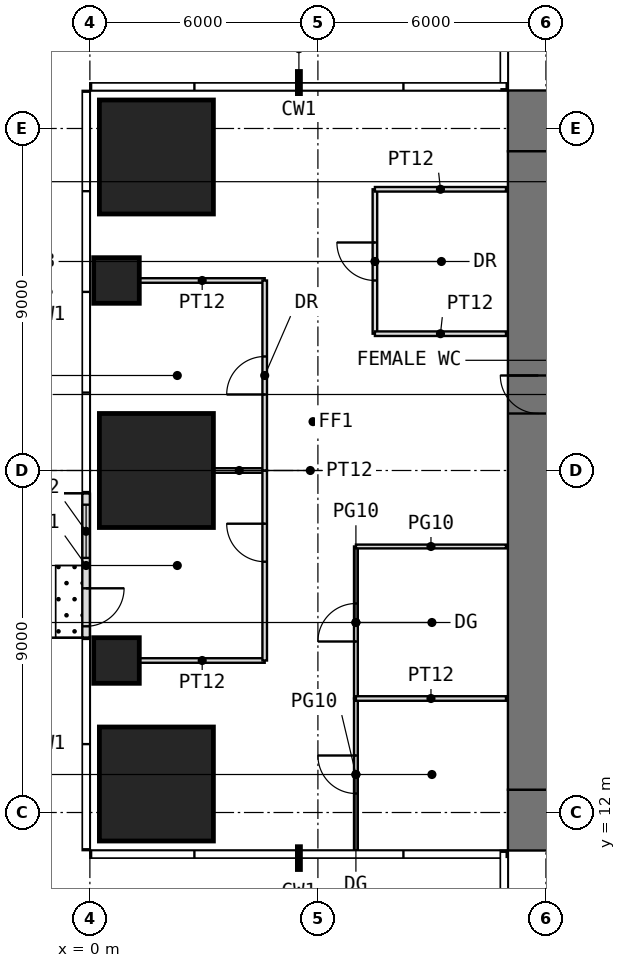
"""IFC4 building model, lengths in metres.
Left out: names, types, materials, properties, quantities, classifications, styles, units other than length and angle.
Written with IfcOpenShell. Run it as: python <this file> out.ifc"""

import sys

from ifc_helpers import new_model, si_unit, direction, frame, frame_2d, origin, origin_2d, place, context, subcontext, project, spatial, rectangle, extrude, element, fill, save


model = new_model("IFC4")
c1 = context("Model", 3, precision=1e-05, world=origin(), true_north=direction((0.0, 1.0)))
c2 = subcontext(c1, "Body", "Model", "MODEL_VIEW")
j1 = project(units=[si_unit("LENGTHUNIT", "METRE"), si_unit("PLANEANGLEUNIT", "RADIAN")], contexts=[c1])
p1 = place(None, origin())
s1 = spatial("IfcSite", under=j1, at=p1, CompositionType="ELEMENT")
p2 = place(p1, origin())
s2 = spatial("IfcBuilding", under=s1, at=p2, CompositionType="ELEMENT")
p3 = place(p2, frame((0.0, 0.0, 112.5)))
s3 = spatial("IfcBuildingStorey", under=s2, at=p3, CompositionType="ELEMENT", Elevation=112.5)
p4 = place(p3, frame((1.75, 12.75, 0.0), z_axis=(0.0, 0.0, 1.0), x_axis=(1.0, 0.0, 0.0)))
e1 = element("IfcColumn", 1, at=p4, inside=s3, PredefinedType="COLUMN", context=c2, shape_type="SweptSolid", body=[
    extrude(rectangle(XDim=3.0, YDim=3.0, at=origin_2d()), origin(), (0.0, 0.0, 1.0), 4.0),
])
p5 = place(p3, frame((0.7, 16.0, 0.0), z_axis=(0.0, 0.0, 1.0), x_axis=(1.0, 0.0, 0.0)))
e2 = element("IfcColumn", 2, at=p5, inside=s3, PredefinedType="COLUMN", context=c2, shape_type="SweptSolid", body=[
    extrude(rectangle(XDim=1.2, YDim=1.2, at=origin_2d()), origin(), (0.0, 0.0, 1.0), 4.0),
])
p6 = place(p3, frame((1.75, 21.0, 0.0), z_axis=(0.0, 0.0, 1.0), x_axis=(1.0, 0.0, 0.0)))
e3 = element("IfcColumn", 3, at=p6, inside=s3, PredefinedType="COLUMN", context=c2, shape_type="SweptSolid", body=[
    extrude(rectangle(XDim=3.0, YDim=3.0, at=origin_2d()), origin(), (0.0, 0.0, 1.0), 4.0),
])
p7 = place(p3, frame((0.7, 26.0, 0.0), z_axis=(0.0, 0.0, 1.0), x_axis=(1.0, 0.0, 0.0)))
e4 = element("IfcColumn", 4, at=p7, inside=s3, PredefinedType="COLUMN", context=c2, shape_type="SweptSolid", body=[
    extrude(rectangle(XDim=1.2, YDim=1.2, at=origin_2d()), origin(), (0.0, 0.0, 1.0), 4.0),
])
p8 = place(p3, frame((1.75, 29.25, 0.0), z_axis=(0.0, 0.0, 1.0), x_axis=(1.0, 0.0, 0.0)))
e5 = element("IfcColumn", 5, at=p8, inside=s3, PredefinedType="COLUMN", context=c2, shape_type="SweptSolid", body=[
    extrude(rectangle(XDim=3.0, YDim=3.0, at=origin_2d()), origin(), (0.0, 0.0, 1.0), 4.0),
])
p9 = place(p3, frame((-0.1, 20.4, 0.0), z_axis=(0.0, 0.0, 1.0), x_axis=(0.0, -1.0, 0.0)))
e6 = element("IfcWall", 6, at=p9, inside=s3, PredefinedType="USERDEFINED", context=c2, shape_type="SweptSolid", body=[
    extrude(rectangle(XDim=3.8, YDim=0.2, at=frame_2d((1.9, 0.0))), origin(), (0.0, 0.0, 1.0), 3.75),
])
p10 = place(p9, frame((2.5, 0.0, 0.0)))
e7 = element("IfcOpeningElement", 7, at=p10, cuts=e6, PredefinedType="OPENING", context=c2, shape_type="SweptSolid", body=[
    extrude(rectangle(XDim=1.0, YDim=2.4, at=frame_2d((0.5, 1.2))), frame((0.0, 0.11, 0.0), z_axis=(0.0, -1.0, 0.0), x_axis=(1.0, 0.0, 0.0)), (0.0, 0.0, 1.0), 0.22),
])
p11 = place(p9, frame((0.3, 0.0, 0.3)))
e8 = element("IfcOpeningElement", 8, at=p11, cuts=e6, PredefinedType="OPENING", context=c2, shape_type="SweptSolid", body=[
    extrude(rectangle(XDim=1.4, YDim=2.7, at=frame_2d((0.7, 1.35))), frame((0.0, 0.11, 0.0), z_axis=(0.0, -1.0, 0.0), x_axis=(1.0, 0.0, 0.0)), (0.0, 0.0, 1.0), 0.22),
])
p12 = place(p3, frame((11.0, 11.8, -0.05), z_axis=(0.0, 0.0, 1.0), x_axis=(1.0, 0.0, 0.0)))
e9 = element("IfcWall", 9, at=p12, inside=s3, PredefinedType="SHEAR", context=c2, shape_type="SweptSolid", body=[
    extrude(rectangle(XDim=20.0, YDim=1.6, at=frame_2d((10.0, 0.0))), origin(), (0.0, 0.0, 1.0), 4.0),
])
p13 = place(p12, frame((9.0, 0.0, 0.05)))
e10 = element("IfcOpeningElement", 10, at=p13, cuts=e9, PredefinedType="OPENING", context=c2, shape_type="SweptSolid", body=[
    extrude(rectangle(XDim=2.0, YDim=2.2, at=frame_2d((1.0, 1.1))), frame((0.0, 0.81, 0.0), z_axis=(0.0, -1.0, 0.0), x_axis=(1.0, 0.0, 0.0)), (0.0, 0.0, 1.0), 1.62),
])
p14 = place(p3, frame((11.0, 30.2, -0.05), z_axis=(0.0, 0.0, 1.0), x_axis=(1.0, 0.0, 0.0)))
e11 = element("IfcWall", 11, at=p14, inside=s3, PredefinedType="SHEAR", context=c2, shape_type="SweptSolid", body=[
    extrude(rectangle(XDim=20.0, YDim=1.6, at=frame_2d((10.0, 0.0))), origin(), (0.0, 0.0, 1.0), 4.0),
])
p15 = place(p14, frame((9.0, 0.0, 0.05)))
e12 = element("IfcOpeningElement", 12, at=p15, cuts=e11, PredefinedType="OPENING", context=c2, shape_type="SweptSolid", body=[
    extrude(rectangle(XDim=2.0, YDim=2.2, at=frame_2d((1.0, 1.1))), frame((0.0, 0.81, 0.0), z_axis=(0.0, -1.0, 0.0), x_axis=(1.0, 0.0, 0.0)), (0.0, 0.0, 1.0), 1.62),
])
p16 = place(p3, frame((11.8, 12.6, -0.05), z_axis=(0.0, 0.0, 1.0), x_axis=(0.0, 1.0, 0.0)))
e13 = element("IfcWall", 13, at=p16, inside=s3, PredefinedType="SHEAR", context=c2, shape_type="SweptSolid", body=[
    extrude(rectangle(XDim=16.8, YDim=1.6, at=frame_2d((8.4, 0.0))), origin(), (0.0, 0.0, 1.0), 4.0),
])
p17 = place(p16, frame((9.9, 0.0, 0.05)))
e14 = element("IfcOpeningElement", 14, at=p17, cuts=e13, PredefinedType="OPENING", context=c2, shape_type="SweptSolid", body=[
    extrude(rectangle(XDim=1.0, YDim=2.2, at=frame_2d((0.5, 1.1))), frame((0.0, 0.81, 0.0), z_axis=(0.0, -1.0, 0.0), x_axis=(1.0, 0.0, 0.0)), (0.0, 0.0, 1.0), 1.62),
])
for number, where, z_axis, x_axis in (
    (15, (1.31, 16.0, 0.0), (0.0, 0.0, 1.0), (1.0, 0.0, 0.0)),
    (16, (1.31, 26.0, 0.0), (0.0, 0.0, 1.0), (1.0, 0.0, 0.0)),
):
    element("IfcWall", number, at=place(p3, frame(where, z_axis=z_axis, x_axis=x_axis)), inside=s3, PredefinedType="PARTITIONING", context=c2, shape_type="SweptSolid", body=[
        extrude(rectangle(XDim=3.29, YDim=0.12, at=frame_2d((1.645, 0.0))), origin(), (0.0, 0.0, 1.0), 3.75),
    ])
p18 = place(p3, frame((3.26, 21.0, 0.0), z_axis=(0.0, 0.0, 1.0), x_axis=(1.0, 0.0, 0.0)))
e17 = element("IfcWall", 17, at=p18, inside=s3, PredefinedType="PARTITIONING", context=c2, shape_type="SweptSolid", body=[
    extrude(rectangle(XDim=1.34, YDim=0.12, at=frame_2d((0.67, 0.0))), origin(), (0.0, 0.0, 1.0), 3.75),
])
p19 = place(p3, frame((4.6, 16.0, 0.0), z_axis=(0.0, 0.0, 1.0), x_axis=(0.0, 1.0, 0.0)))
e18 = element("IfcWall", 18, at=p19, inside=s3, PredefinedType="PARTITIONING", context=c2, shape_type="SweptSolid", body=[
    extrude(rectangle(XDim=5.0, YDim=0.12, at=frame_2d((2.5, 0.0))), origin(), (0.0, 0.0, 1.0), 3.75),
])
p20 = place(p19, frame((2.6, 0.0, 0.0)))
e19 = element("IfcOpeningElement", 19, at=p20, cuts=e18, PredefinedType="OPENING", context=c2, shape_type="SweptSolid", body=[
    extrude(rectangle(XDim=1.0, YDim=2.2, at=frame_2d((0.5, 1.1))), frame((0.0, 0.07, 0.0), z_axis=(0.0, -1.0, 0.0), x_axis=(1.0, 0.0, 0.0)), (0.0, 0.0, 1.0), 0.14),
])
p21 = place(p3, frame((4.6, 21.0, 0.0), z_axis=(0.0, 0.0, 1.0), x_axis=(0.0, 1.0, 0.0)))
e20 = element("IfcWall", 20, at=p21, inside=s3, PredefinedType="PARTITIONING", context=c2, shape_type="SweptSolid", body=[
    extrude(rectangle(XDim=5.0, YDim=0.12, at=frame_2d((2.5, 0.0))), origin(), (0.0, 0.0, 1.0), 3.75),
])
p22 = place(p21, frame((2.0, 0.0, 0.0)))
e21 = element("IfcOpeningElement", 21, at=p22, cuts=e20, PredefinedType="OPENING", context=c2, shape_type="SweptSolid", body=[
    extrude(rectangle(XDim=1.0, YDim=2.2, at=frame_2d((0.5, 1.1))), frame((0.0, 0.07, 0.0), z_axis=(0.0, -1.0, 0.0), x_axis=(1.0, 0.0, 0.0)), (0.0, 0.0, 1.0), 0.14),
])
p23 = place(p3, frame((7.0, 11.0, 0.0), z_axis=(0.0, 0.0, 1.0), x_axis=(0.0, 1.0, 0.0)))
e22 = element("IfcWall", 22, at=p23, inside=s3, PredefinedType="PARTITIONING", context=c2, shape_type="SweptSolid", body=[
    extrude(rectangle(XDim=4.0, YDim=0.1, at=frame_2d((2.0, 0.0))), origin(), (0.0, 0.0, 1.0), 3.75),
])
p24 = place(p23, frame((1.5, 0.0, 0.0)))
e23 = element("IfcOpeningElement", 23, at=p24, cuts=e22, PredefinedType="OPENING", context=c2, shape_type="SweptSolid", body=[
    extrude(rectangle(XDim=1.0, YDim=2.4, at=frame_2d((0.5, 1.2))), frame((0.0, 0.06, 0.0), z_axis=(0.0, -1.0, 0.0), x_axis=(1.0, 0.0, 0.0)), (0.0, 0.0, 1.0), 0.12),
])
p25 = place(p3, frame((7.0, 15.0, 0.0), z_axis=(0.0, 0.0, 1.0), x_axis=(0.0, 1.0, 0.0)))
e24 = element("IfcWall", 24, at=p25, inside=s3, PredefinedType="PARTITIONING", context=c2, shape_type="SweptSolid", body=[
    extrude(rectangle(XDim=4.0, YDim=0.1, at=frame_2d((2.0, 0.0))), origin(), (0.0, 0.0, 1.0), 3.75),
])
p26 = place(p25, frame((1.5, 0.0, 0.0)))
e25 = element("IfcOpeningElement", 25, at=p26, cuts=e24, PredefinedType="OPENING", context=c2, shape_type="SweptSolid", body=[
    extrude(rectangle(XDim=1.0, YDim=2.4, at=frame_2d((0.5, 1.2))), frame((0.0, 0.06, 0.0), z_axis=(0.0, -1.0, 0.0), x_axis=(1.0, 0.0, 0.0)), (0.0, 0.0, 1.0), 0.12),
])
p27 = place(p3, frame((7.0, 15.0, 0.0), z_axis=(0.0, 0.0, 1.0), x_axis=(1.0, 0.0, 0.0)))
e26 = element("IfcWall", 26, at=p27, inside=s3, PredefinedType="PARTITIONING", context=c2, shape_type="SweptSolid", body=[
    extrude(rectangle(XDim=3.95, YDim=0.12, at=frame_2d((1.975, 0.0))), origin(), (0.0, 0.0, 1.0), 3.75),
])
p28 = place(p3, frame((7.0, 19.0, 0.0), z_axis=(0.0, 0.0, 1.0), x_axis=(1.0, 0.0, 0.0)))
e27 = element("IfcWall", 27, at=p28, inside=s3, PredefinedType="PARTITIONING", context=c2, shape_type="SweptSolid", body=[
    extrude(rectangle(XDim=3.95, YDim=0.1, at=frame_2d((1.975, 0.0))), origin(), (0.0, 0.0, 1.0), 3.75),
])
p29 = place(p3, frame((7.5, 24.6, 0.0), z_axis=(0.0, 0.0, 1.0), x_axis=(0.0, 1.0, 0.0)))
e28 = element("IfcWall", 28, at=p29, inside=s3, PredefinedType="PARTITIONING", context=c2, shape_type="SweptSolid", body=[
    extrude(rectangle(XDim=3.8, YDim=0.12, at=frame_2d((1.9, 0.0))), origin(), (0.0, 0.0, 1.0), 3.75),
])
p30 = place(p29, frame((1.4, 0.0, 0.0)))
e29 = element("IfcOpeningElement", 29, at=p30, cuts=e28, PredefinedType="OPENING", context=c2, shape_type="SweptSolid", body=[
    extrude(rectangle(XDim=1.0, YDim=2.2, at=frame_2d((0.5, 1.1))), frame((0.0, 0.07, 0.0), z_axis=(0.0, -1.0, 0.0), x_axis=(1.0, 0.0, 0.0)), (0.0, 0.0, 1.0), 0.14),
])
for number, where, z_axis, x_axis in (
    (30, (7.5, 24.6, 0.0), (0.0, 0.0, 1.0), (1.0, 0.0, 0.0)),
    (31, (7.5, 28.4, 0.0), (0.0, 0.0, 1.0), (1.0, 0.0, 0.0)),
):
    element("IfcWall", number, at=place(p3, frame(where, z_axis=z_axis, x_axis=x_axis)), inside=s3, PredefinedType="PARTITIONING", context=c2, shape_type="SweptSolid", body=[
        extrude(rectangle(XDim=3.45, YDim=0.12, at=frame_2d((1.725, 0.0))), origin(), (0.0, 0.0, 1.0), 3.75),
    ])
p31 = place(p10, origin())
e32 = element("IfcDoor", 32, at=p31, inside=s3, OperationType="SINGLE_SWING_LEFT", PredefinedType="DOOR", context=c2, shape_type="SweptSolid", body=[
    extrude(rectangle(XDim=1.0, YDim=2.4, at=frame_2d((0.5, 1.2))), frame((0.0, 0.025, 0.0), z_axis=(0.0, -1.0, 0.0), x_axis=(1.0, 0.0, 0.0)), (0.0, 0.0, 1.0), 0.05),
])
fill(e7, e32)
p32 = place(p11, origin())
e33 = element("IfcWindow", 33, at=p32, inside=s3, PartitioningType="SINGLE_PANEL", PredefinedType="WINDOW", context=c2, shape_type="SweptSolid", body=[
    extrude(rectangle(XDim=1.4, YDim=2.7, at=frame_2d((0.7, 1.35))), frame((0.0, 0.03, 0.0), z_axis=(0.0, -1.0, 0.0), x_axis=(1.0, 0.0, 0.0)), (0.0, 0.0, 1.0), 0.06),
])
fill(e8, e33)
p33 = place(p17, origin())
e34 = element("IfcDoor", 34, at=p33, inside=s3, OperationType="SINGLE_SWING_RIGHT", PredefinedType="DOOR", context=c2, shape_type="SweptSolid", body=[
    extrude(rectangle(XDim=1.0, YDim=2.2, at=frame_2d((0.5, 1.1))), frame((0.0, 0.025, 0.0), z_axis=(0.0, -1.0, 0.0), x_axis=(1.0, 0.0, 0.0)), (0.0, 0.0, 1.0), 0.05),
])
fill(e14, e34)
p34 = place(p24, origin())
e35 = element("IfcDoor", 35, at=p34, inside=s3, OperationType="SINGLE_SWING_RIGHT", PredefinedType="DOOR", context=c2, shape_type="SweptSolid", body=[
    extrude(rectangle(XDim=1.0, YDim=2.4, at=frame_2d((0.5, 1.2))), frame((0.0, 0.025, 0.0), z_axis=(0.0, -1.0, 0.0), x_axis=(1.0, 0.0, 0.0)), (0.0, 0.0, 1.0), 0.05),
])
fill(e23, e35)
p35 = place(p26, origin())
e36 = element("IfcDoor", 36, at=p35, inside=s3, OperationType="SINGLE_SWING_LEFT", PredefinedType="DOOR", context=c2, shape_type="SweptSolid", body=[
    extrude(rectangle(XDim=1.0, YDim=2.4, at=frame_2d((0.5, 1.2))), frame((0.0, 0.025, 0.0), z_axis=(0.0, -1.0, 0.0), x_axis=(1.0, 0.0, 0.0)), (0.0, 0.0, 1.0), 0.05),
])
fill(e25, e36)
p36 = place(p30, origin())
e37 = element("IfcDoor", 37, at=p36, inside=s3, OperationType="SINGLE_SWING_RIGHT", PredefinedType="DOOR", context=c2, shape_type="SweptSolid", body=[
    extrude(rectangle(XDim=1.0, YDim=2.2, at=frame_2d((0.5, 1.1))), frame((0.0, 0.025, 0.0), z_axis=(0.0, -1.0, 0.0), x_axis=(1.0, 0.0, 0.0)), (0.0, 0.0, 1.0), 0.05),
])
fill(e29, e37)
p37 = place(p20, origin())
e38 = element("IfcDoor", 38, at=p37, inside=s3, OperationType="SINGLE_SWING_RIGHT", PredefinedType="DOOR", context=c2, shape_type="SweptSolid", body=[
    extrude(rectangle(XDim=1.0, YDim=2.2, at=frame_2d((0.5, 1.1))), frame((0.0, 0.025, 0.0), z_axis=(0.0, -1.0, 0.0), x_axis=(1.0, 0.0, 0.0)), (0.0, 0.0, 1.0), 0.05),
])
fill(e19, e38)
p38 = place(p22, origin())
e39 = element("IfcDoor", 39, at=p38, inside=s3, OperationType="SINGLE_SWING_LEFT", PredefinedType="DOOR", context=c2, shape_type="SweptSolid", body=[
    extrude(rectangle(XDim=1.0, YDim=2.2, at=frame_2d((0.5, 1.1))), frame((0.0, 0.025, 0.0), z_axis=(0.0, -1.0, 0.0), x_axis=(1.0, 0.0, 0.0)), (0.0, 0.0, 1.0), 0.05),
])
fill(e21, e39)
save(model, sys.argv[1])
